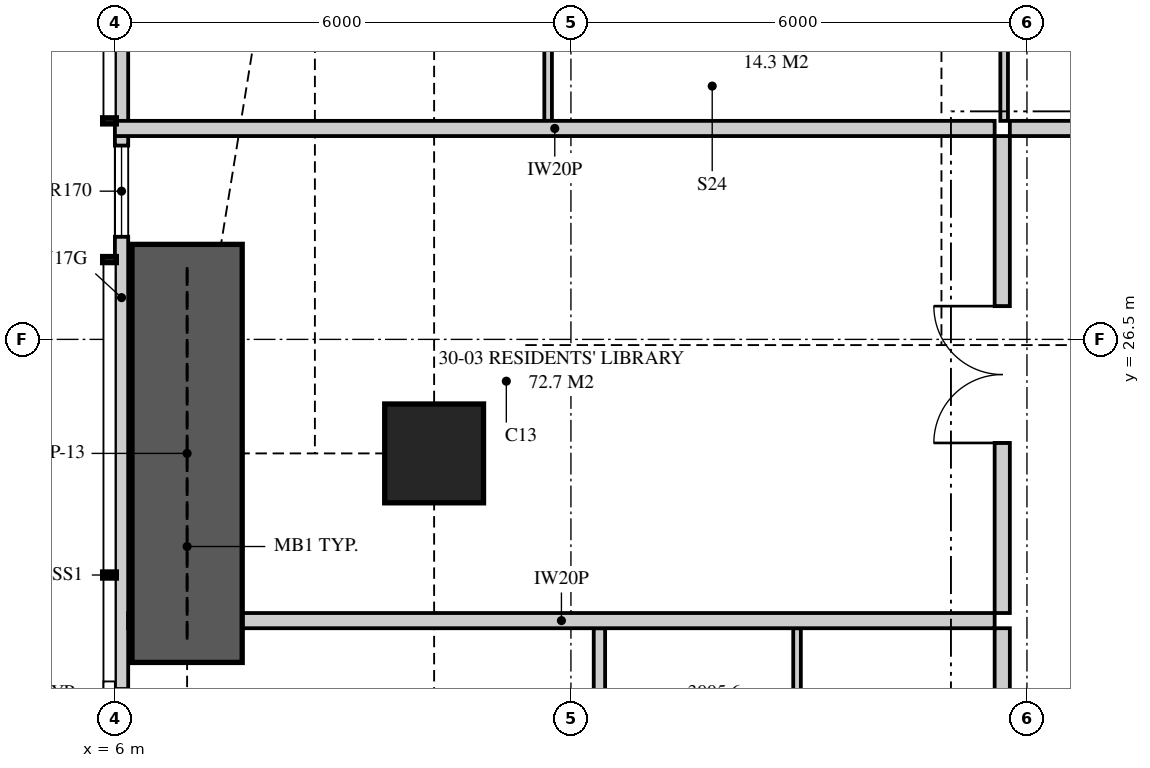
"""IFC4 building model, lengths in metres.
Left out: names, types, materials, properties, quantities, classifications, styles, units other than length and angle.
Written with IfcOpenShell. Run it as: python <this file> out.ifc"""

import sys

from ifc_helpers import new_model, si_unit, direction, frame, frame_2d, origin, origin_2d, place, context, subcontext, project, spatial, polyline, rectangle, outline, extrude, element, fill, save


model = new_model("IFC4")
c1 = context("Model", 3, precision=1e-05, world=origin(), true_north=direction((0.0, 1.0)))
c2 = subcontext(c1, "Body", "Model", "MODEL_VIEW")
j1 = project(units=[si_unit("LENGTHUNIT", "METRE"), si_unit("PLANEANGLEUNIT", "RADIAN")], contexts=[c1])
p1 = place(None, origin())
s1 = spatial("IfcSite", under=j1, at=p1, CompositionType="ELEMENT")
p2 = place(p1, origin())
s2 = spatial("IfcBuilding", under=s1, at=p2, CompositionType="ELEMENT")
p3 = place(p2, frame((0.0, 0.0, 111.55)))
s3 = spatial("IfcBuildingStorey", under=s2, at=p3, CompositionType="ELEMENT", Elevation=111.55)
p4 = place(p3, frame((10.2, 25.0, 0.0), z_axis=(0.0, 0.0, 1.0), x_axis=(1.0, 0.0, 0.0)))
e1 = element("IfcColumn", 1, at=p4, inside=s3, PredefinedType="COLUMN", context=c2, shape_type="SweptSolid", body=[
    extrude(rectangle(XDim=1.3, YDim=1.3, at=origin_2d()), origin(), (0.0, 0.0, 1.0), 3.35),
])
p5 = place(p3, frame((6.087, 34.949, 0.0), z_axis=(0.0, 0.0, 1.0), x_axis=(0.0, -1.0, 0.0)))
e2 = element("IfcWall", 2, at=p5, inside=s3, PredefinedType="SOLIDWALL", context=c2, shape_type="SweptSolid", body=[
    extrude(outline(polyline([(0.0, 0.0), (15.799, 0.0), (15.799, 2.15), (9.949, 2.15), (9.949, 3.11), (9.823, 3.11), (9.823, 2.15), (9.73, 2.15), (9.73, 3.11), (0.0, 3.11), (0.0, 0.0)])), frame((0.0, 0.087, 0.0), z_axis=(0.0, -1.0, 0.0), x_axis=(1.0, 0.0, 0.0)), (0.0, 0.0, 1.0), 0.175),
])
p6 = place(p5, frame((2.618, 0.0, 0.4)))
e3 = element("IfcOpeningElement", 3, at=p6, cuts=e2, PredefinedType="OPENING", context=c2, shape_type="SweptSolid", body=[
    extrude(rectangle(XDim=1.8, YDim=1.7, at=frame_2d((0.9, 0.85))), frame((0.0, 0.097, 0.0), z_axis=(0.0, -1.0, 0.0), x_axis=(1.0, 0.0, 0.0)), (0.0, 0.0, 1.0), 0.195),
])
p7 = place(p5, frame((5.899, 0.0, 0.4)))
e4 = element("IfcOpeningElement", 4, at=p7, cuts=e2, PredefinedType="OPENING", context=c2, shape_type="SweptSolid", body=[
    extrude(rectangle(XDim=1.2, YDim=1.7, at=frame_2d((0.6, 0.85))), frame((0.0, 0.097, 0.0), z_axis=(0.0, -1.0, 0.0), x_axis=(1.0, 0.0, 0.0)), (0.0, 0.0, 1.0), 0.195),
])
p8 = place(p5, frame((13.049, 0.0, 0.4)))
e5 = element("IfcOpeningElement", 5, at=p8, cuts=e2, PredefinedType="OPENING", context=c2, shape_type="SweptSolid", body=[
    extrude(rectangle(XDim=1.8, YDim=1.7, at=frame_2d((0.9, 0.85))), frame((0.0, 0.097, 0.0), z_axis=(0.0, -1.0, 0.0), x_axis=(1.0, 0.0, 0.0)), (0.0, 0.0, 1.0), 0.195),
])
p9 = place(p3, frame((17.775, 29.275, 0.0), z_axis=(0.0, 0.0, 1.0), x_axis=(1.0, 0.0, 0.0)))
e6 = element("IfcWall", 6, at=p9, inside=s3, PredefinedType="PARTITIONING", context=c2, shape_type="SweptSolid", body=[
    extrude(rectangle(XDim=9.188, YDim=0.2, at=frame_2d((4.594, 0.0))), origin(), (0.0, 0.0, 1.0), 3.11),
])
p10 = place(p9, frame((5.05, 0.0, 0.0)))
e7 = element("IfcOpeningElement", 7, at=p10, cuts=e6, PredefinedType="OPENING", context=c2, shape_type="SweptSolid", body=[
    extrude(rectangle(XDim=1.05, YDim=2.2, at=frame_2d((0.525, 1.1))), frame((0.0, 0.11, 0.0), z_axis=(0.0, -1.0, 0.0), x_axis=(1.0, 0.0, 0.0)), (0.0, 0.0, 1.0), 0.22),
])
p11 = place(p3, frame((11.7, 37.825, 0.0), z_axis=(0.0, 0.0, 1.0), x_axis=(0.0, -1.0, 0.0)))
e8 = element("IfcWall", 8, at=p11, inside=s3, PredefinedType="PARTITIONING", context=c2, shape_type="SweptSolid", body=[
    extrude(outline(polyline([(0.0, 0.0), (8.45, 0.0), (8.45, 3.11), (2.708, 3.11), (2.708, 2.15), (0.953, 2.15), (0.953, 3.11), (0.0, 3.11), (0.0, 0.0)])), frame((0.0, 0.05, 0.0), z_axis=(0.0, -1.0, 0.0), x_axis=(1.0, 0.0, 0.0)), (0.0, 0.0, 1.0), 0.1),
])
p12 = place(p11, frame((2.489, 0.0, 0.0)))
e9 = element("IfcOpeningElement", 9, at=p12, cuts=e8, PredefinedType="OPENING", context=c2, shape_type="SweptSolid", body=[
    extrude(rectangle(XDim=0.9, YDim=2.1, at=frame_2d((0.45, 1.05))), frame((0.0, 0.06, 0.0), z_axis=(0.0, -1.0, 0.0), x_axis=(1.0, 0.0, 0.0)), (0.0, 0.0, 1.0), 0.12),
])
p13 = place(p11, frame((5.919, 0.0, 0.0)))
e10 = element("IfcOpeningElement", 10, at=p13, cuts=e8, PredefinedType="OPENING", context=c2, shape_type="SweptSolid", body=[
    extrude(rectangle(XDim=0.9, YDim=2.1, at=frame_2d((0.45, 1.05))), frame((0.0, 0.06, 0.0), z_axis=(0.0, -1.0, 0.0), x_axis=(1.0, 0.0, 0.0)), (0.0, 0.0, 1.0), 0.12),
])
p14 = place(p3, frame((17.7, 37.825, 0.0), z_axis=(0.0, 0.0, 1.0), x_axis=(0.0, -1.0, 0.0)))
e11 = element("IfcWall", 11, at=p14, inside=s3, PredefinedType="PARTITIONING", context=c2, shape_type="SweptSolid", body=[
    extrude(outline(polyline([(1.635, 2.15), (0.0, 2.15), (0.0, 0.0), (8.45, 0.0), (8.45, 3.11), (1.635, 3.11), (1.635, 2.15)]), holes=[polyline([(1.021, 0.116), (0.529, 0.116), (0.529, 0.906), (1.021, 0.906), (1.021, 0.116)]), polyline([(1.021, 1.244), (0.529, 1.244), (0.529, 2.034), (1.021, 2.034), (1.021, 1.244)])]), frame((0.0, 0.05, 0.0), z_axis=(0.0, -1.0, 0.0), x_axis=(1.0, 0.0, 0.0)), (0.0, 0.0, 1.0), 0.1),
])
p15 = place(p14, frame((4.6, 0.0, 0.0)))
e12 = element("IfcOpeningElement", 12, at=p15, cuts=e11, PredefinedType="OPENING", context=c2, shape_type="SweptSolid", body=[
    extrude(rectangle(XDim=0.9, YDim=2.1, at=frame_2d((0.45, 1.05))), frame((0.0, 0.06, 0.0), z_axis=(0.0, -1.0, 0.0), x_axis=(1.0, 0.0, 0.0)), (0.0, 0.0, 1.0), 0.12),
])
p16 = place(p3, frame((6.0, 29.275, 0.0), z_axis=(0.0, 0.0, 1.0), x_axis=(1.0, 0.0, 0.0)))
e13 = element("IfcWall", 13, at=p16, inside=s3, PredefinedType="PARTITIONING", context=c2, shape_type="SweptSolid", body=[
    extrude(outline(polyline([(0.0, 0.0), (11.575, 0.0), (11.575, 3.11), (11.212, 3.11), (11.212, 2.541), (10.538, 2.541), (10.538, 3.11), (5.51, 3.11), (5.51, 2.51), (2.969, 2.51), (2.969, 2.541), (2.565, 2.541), (2.565, 2.15), (0.721, 2.15), (0.721, 3.11), (0.0, 3.11), (0.0, 0.0)])), frame((0.0, 0.1, 0.0), z_axis=(0.0, -1.0, 0.0), x_axis=(1.0, 0.0, 0.0)), (0.0, 0.0, 1.0), 0.2),
])
p17 = place(p3, frame((6.175, 22.8, 0.0), z_axis=(0.0, 0.0, 1.0), x_axis=(1.0, 0.0, 0.0)))
e14 = element("IfcWall", 14, at=p17, inside=s3, PredefinedType="PARTITIONING", context=c2, shape_type="SweptSolid", body=[
    extrude(outline(polyline([(0.0, 0.0), (11.4, 0.0), (11.4, 3.11), (5.335, 3.11), (5.335, 2.51), (2.715, 2.51), (2.715, 3.11), (1.685, 3.11), (1.685, 2.15), (0.0, 2.15), (0.0, 0.0)])), frame((0.0, 0.1, 0.0), z_axis=(0.0, -1.0, 0.0), x_axis=(1.0, 0.0, 0.0)), (0.0, 0.0, 1.0), 0.2),
])
p18 = place(p3, frame((12.375, 19.25, 0.0), z_axis=(0.0, 0.0, 1.0), x_axis=(0.0, 1.0, 0.0)))
e15 = element("IfcWall", 15, at=p18, inside=s3, PredefinedType="PLUMBINGWALL", context=c2, shape_type="SweptSolid", body=[
    extrude(rectangle(XDim=3.45, YDim=0.15, at=frame_2d((1.725, 0.0))), origin(), (0.0, 0.0, 1.0), 3.11),
])
p19 = place(p18, frame((0.4, 0.0, 0.0)))
e16 = element("IfcOpeningElement", 16, at=p19, cuts=e15, PredefinedType="OPENING", context=c2, shape_type="SweptSolid", body=[
    extrude(rectangle(XDim=0.9, YDim=2.1, at=frame_2d((0.45, 1.05))), frame((0.0, 0.085, 0.0), z_axis=(0.0, -1.0, 0.0), x_axis=(1.0, 0.0, 0.0)), (0.0, 0.0, 1.0), 0.17),
])
p20 = place(p3, frame((14.975, 19.25, 0.0), z_axis=(0.0, 0.0, 1.0), x_axis=(0.0, 1.0, 0.0)))
e17 = element("IfcWall", 17, at=p20, inside=s3, PredefinedType="PARTITIONING", context=c2, shape_type="SweptSolid", body=[
    extrude(rectangle(XDim=3.45, YDim=0.1, at=frame_2d((1.725, 0.0))), origin(), (0.0, 0.0, 1.0), 3.11),
])
p21 = place(p3, frame((17.675, 22.9, 0.0), z_axis=(0.0, 0.0, 1.0), x_axis=(0.0, 1.0, 0.0)))
e18 = element("IfcWall", 18, at=p21, inside=s3, PredefinedType="PARTITIONING", context=c2, shape_type="SweptSolid", body=[
    extrude(outline(polyline([(0.0, 0.0), (6.275, 0.0), (6.275, 3.11), (3.862, 3.11), (3.862, 2.541), (3.188, 2.541), (3.188, 3.11), (0.0, 3.11), (0.0, 0.0)])), frame((0.0, 0.1, 0.0), z_axis=(0.0, -1.0, 0.0), x_axis=(1.0, 0.0, 0.0)), (0.0, 0.0, 1.0), 0.2),
])
p22 = place(p21, frame((2.238, 0.0, 0.0)))
e19 = element("IfcOpeningElement", 19, at=p22, cuts=e18, PredefinedType="OPENING", context=c2, shape_type="SweptSolid", body=[
    extrude(rectangle(XDim=1.8, YDim=2.1, at=frame_2d((0.9, 1.05))), frame((0.0, 0.11, 0.0), z_axis=(0.0, -1.0, 0.0), x_axis=(1.0, 0.0, 0.0)), (0.0, 0.0, 1.0), 0.22),
])
p23 = place(p3, frame((17.675, 17.262, 0.0), z_axis=(0.0, 0.0, 1.0), x_axis=(0.0, 1.0, 0.0)))
e20 = element("IfcWall", 20, at=p23, inside=s3, PredefinedType="PARTITIONING", context=c2, shape_type="SweptSolid", body=[
    extrude(rectangle(XDim=5.438, YDim=0.2, at=frame_2d((2.719, 0.0))), origin(), (0.0, 0.0, 1.0), 3.11),
])
p24 = place(p3, frame((6.95, 22.25, 0.0), z_axis=(0.0, 0.0, 1.0), x_axis=(0.0, 1.0, 0.0)))
e21 = element("IfcWall", 21, at=p24, inside=s3, PredefinedType="SHEAR", context=c2, shape_type="SweptSolid", body=[
    extrude(rectangle(XDim=5.5, YDim=1.45, at=frame_2d((2.75, 0.0))), origin(), (0.0, 0.0, 1.0), 3.35),
])
p25 = place(p7, origin())
e22 = element("IfcWindow", 22, at=p25, inside=s3, PartitioningType="SINGLE_PANEL", PredefinedType="WINDOW", context=c2, shape_type="SweptSolid", body=[
    extrude(rectangle(XDim=1.2, YDim=1.7, at=frame_2d((0.6, 0.85))), frame((0.0, 0.03, 0.0), z_axis=(0.0, -1.0, 0.0), x_axis=(1.0, 0.0, 0.0)), (0.0, 0.0, 1.0), 0.06),
])
fill(e4, e22)
p26 = place(p8, origin())
e23 = element("IfcWindow", 23, at=p26, inside=s3, PartitioningType="SINGLE_PANEL", PredefinedType="WINDOW", context=c2, shape_type="SweptSolid", body=[
    extrude(rectangle(XDim=1.8, YDim=1.7, at=frame_2d((0.9, 0.85))), frame((0.0, 0.03, 0.0), z_axis=(0.0, -1.0, 0.0), x_axis=(1.0, 0.0, 0.0)), (0.0, 0.0, 1.0), 0.06),
])
fill(e5, e23)
p27 = place(p22, origin())
e24 = element("IfcDoor", 24, at=p27, inside=s3, OperationType="DOUBLE_DOOR_SINGLE_SWING", PredefinedType="DOOR", context=c2, shape_type="SweptSolid", body=[
    extrude(rectangle(XDim=1.8, YDim=2.1, at=frame_2d((0.9, 1.05))), frame((0.0, 0.025, 0.0), z_axis=(0.0, -1.0, 0.0), x_axis=(1.0, 0.0, 0.0)), (0.0, 0.0, 1.0), 0.05),
])
fill(e19, e24)
save(model, sys.argv[1])
